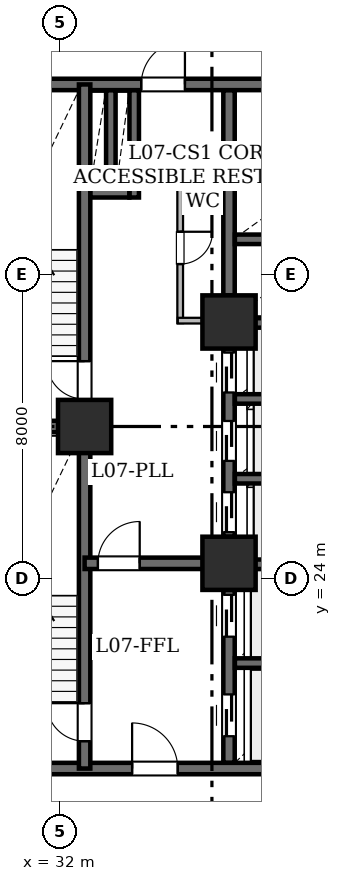
"""IFC4 building model, lengths in metres.
Left out: names, types, materials, properties, quantities, classifications, styles, units other than length and angle.
Written with IfcOpenShell. Run it as: python <this file> out.ifc"""

import sys

from ifc_helpers import new_model, si_unit, direction, frame, frame_2d, origin, origin_2d, place, context, subcontext, project, spatial, rectangle, hollow_rectangle, extrude, element, fill, save


model = new_model("IFC4")
c1 = context("Model", 3, precision=1e-05, world=origin(), true_north=direction((0.0, 1.0)))
c2 = subcontext(c1, "Body", "Model", "MODEL_VIEW")
j1 = project(units=[si_unit("LENGTHUNIT", "METRE"), si_unit("PLANEANGLEUNIT", "RADIAN")], contexts=[c1])
p1 = place(None, origin())
s1 = spatial("IfcSite", under=j1, at=p1, CompositionType="ELEMENT")
p2 = place(p1, origin())
s2 = spatial("IfcBuilding", under=s1, at=p2, CompositionType="ELEMENT")
p3 = place(p2, frame((0.0, 0.0, 33.3)))
s3 = spatial("IfcBuildingStorey", under=s2, at=p3, CompositionType="ELEMENT", Elevation=33.3)
for number, where, z_axis, x_axis in (
    (1, (32.65, 28.0, 0.0), (0.0, 0.0, 1.0), (1.0, 0.0, 0.0)),
    (2, (36.45, 24.4, 0.0), (0.0, 0.0, 1.0), (1.0, 0.0, 0.0)),
    (3, (36.45, 30.75, 0.0), (0.0, 0.0, 1.0), (1.0, 0.0, 0.0)),
):
    element("IfcColumn", number, at=place(p3, frame(where, z_axis=z_axis, x_axis=x_axis)), inside=s3, PredefinedType="COLUMN", context=c2, shape_type="SweptSolid", body=[
        extrude(hollow_rectangle(XDim=1.4, YDim=1.4, WallThickness=0.07, at=origin_2d()), origin(), (0.0, 0.0, 1.0), 3.65),
    ])
p4 = place(p3, frame((29.0, 19.0, 0.0), z_axis=(0.0, 0.0, 1.0), x_axis=(1.0, 0.0, 0.0)))
e4 = element("IfcWall", 4, at=p4, inside=s3, PredefinedType="SHEAR", context=c2, shape_type="SweptSolid", body=[
    extrude(rectangle(XDim=10.4, YDim=0.3, at=frame_2d((5.2, 0.0))), origin(), (0.0, 0.0, 1.0), 3.43),
])
p5 = place(p4, frame((4.9, 0.0, 0.0)))
e5 = element("IfcOpeningElement", 5, at=p5, cuts=e4, PredefinedType="OPENING", context=c2, shape_type="SweptSolid", body=[
    extrude(rectangle(XDim=1.2, YDim=2.15, at=frame_2d((0.6, 1.075))), frame((0.0, 0.16, 0.0), z_axis=(0.0, -1.0, 0.0), x_axis=(1.0, 0.0, 0.0)), (0.0, 0.0, 1.0), 0.32),
])
p6 = place(p3, frame((29.0, 37.0, 0.0), z_axis=(0.0, 0.0, 1.0), x_axis=(1.0, 0.0, 0.0)))
e6 = element("IfcWall", 6, at=p6, inside=s3, PredefinedType="SHEAR", context=c2, shape_type="SweptSolid", body=[
    extrude(rectangle(XDim=10.4, YDim=0.3, at=frame_2d((5.2, 0.0))), origin(), (0.0, 0.0, 1.0), 3.43),
])
p7 = place(p6, frame((5.14, 0.0, 0.0)))
e7 = element("IfcOpeningElement", 7, at=p7, cuts=e6, PredefinedType="OPENING", context=c2, shape_type="SweptSolid", body=[
    extrude(rectangle(XDim=1.15, YDim=2.2, at=frame_2d((0.575, 1.1))), frame((0.0, 0.16, 0.0), z_axis=(0.0, -1.0, 0.0), x_axis=(1.0, 0.0, 0.0)), (0.0, 0.0, 1.0), 0.32),
])
p8 = place(p3, frame((32.65, 19.0, 0.0), z_axis=(0.0, 0.0, 1.0), x_axis=(0.0, 1.0, 0.0)))
e8 = element("IfcWall", 8, at=p8, inside=s3, PredefinedType="SHEAR", context=c2, shape_type="SweptSolid", body=[
    extrude(rectangle(XDim=9.0, YDim=0.3, at=frame_2d((4.5, 0.0))), origin(), (0.0, 0.0, 1.0), 3.43),
])
p9 = place(p8, frame((0.72, 0.0, 0.0)))
e9 = element("IfcOpeningElement", 9, at=p9, cuts=e8, PredefinedType="OPENING", context=c2, shape_type="SweptSolid", body=[
    extrude(rectangle(XDim=1.0, YDim=2.15, at=frame_2d((0.5, 1.075))), frame((0.0, 0.16, 0.0), z_axis=(0.0, -1.0, 0.0), x_axis=(1.0, 0.0, 0.0)), (0.0, 0.0, 1.0), 0.32),
])
p10 = place(p3, frame((32.65, 28.0, 0.0), z_axis=(0.0, 0.0, 1.0), x_axis=(0.0, 1.0, 0.0)))
e10 = element("IfcWall", 10, at=p10, inside=s3, PredefinedType="SHEAR", context=c2, shape_type="SweptSolid", body=[
    extrude(rectangle(XDim=9.0, YDim=0.3, at=frame_2d((4.5, 0.0))), origin(), (0.0, 0.0, 1.0), 3.43),
])
p11 = place(p10, frame((0.72, 0.0, 0.0)))
e11 = element("IfcOpeningElement", 11, at=p11, cuts=e10, PredefinedType="OPENING", context=c2, shape_type="SweptSolid", body=[
    extrude(rectangle(XDim=1.0, YDim=2.15, at=frame_2d((0.5, 1.075))), frame((0.0, 0.16, 0.0), z_axis=(0.0, -1.0, 0.0), x_axis=(1.0, 0.0, 0.0)), (0.0, 0.0, 1.0), 0.32),
])
p12 = place(p3, frame((29.0, 28.0, 0.0), z_axis=(0.0, 0.0, 1.0), x_axis=(1.0, 0.0, 0.0)))
e12 = element("IfcWall", 12, at=p12, inside=s3, PredefinedType="SHEAR", context=c2, shape_type="SweptSolid", body=[
    extrude(rectangle(XDim=3.65, YDim=0.3, at=frame_2d((1.825, 0.0))), origin(), (0.0, 0.0, 1.0), 3.43),
])
p13 = place(p3, frame((32.65, 24.4, 0.0), z_axis=(0.0, 0.0, 1.0), x_axis=(1.0, 0.0, 0.0)))
e13 = element("IfcWall", 13, at=p13, inside=s3, PredefinedType="SHEAR", context=c2, shape_type="SweptSolid", body=[
    extrude(rectangle(XDim=3.8, YDim=0.3, at=frame_2d((1.9, 0.0))), origin(), (0.0, 0.0, 1.0), 3.43),
])
p14 = place(p13, frame((0.35, 0.0, 0.0)))
e14 = element("IfcOpeningElement", 14, at=p14, cuts=e13, PredefinedType="OPENING", context=c2, shape_type="SweptSolid", body=[
    extrude(rectangle(XDim=1.1, YDim=2.15, at=frame_2d((0.55, 1.075))), frame((0.0, 0.16, 0.0), z_axis=(0.0, -1.0, 0.0), x_axis=(1.0, 0.0, 0.0)), (0.0, 0.0, 1.0), 0.32),
])
p15 = place(p3, frame((36.45, 19.154, 0.0), z_axis=(0.0, 0.0, 1.0), x_axis=(0.0, 1.0, 0.0)))
e15 = element("IfcWall", 15, at=p15, inside=s3, PredefinedType="SHEAR", context=c2, shape_type="SweptSolid", body=[
    extrude(rectangle(XDim=4.546, YDim=0.3, at=frame_2d((2.273, 0.0))), origin(), (0.0, 0.0, 1.0), 3.43),
])
p16 = place(p15, frame((0.696, 0.0, 0.0)))
e16 = element("IfcOpeningElement", 16, at=p16, cuts=e15, PredefinedType="OPENING", context=c2, shape_type="SweptSolid", body=[
    extrude(rectangle(XDim=1.1, YDim=2.15, at=frame_2d((0.55, 1.075))), frame((0.0, 0.16, 0.0), z_axis=(0.0, -1.0, 0.0), x_axis=(1.0, 0.0, 0.0)), (0.0, 0.0, 1.0), 0.32),
])
p17 = place(p15, frame((3.316, 0.0, 0.0)))
e17 = element("IfcOpeningElement", 17, at=p17, cuts=e15, PredefinedType="OPENING", context=c2, shape_type="SweptSolid", body=[
    extrude(rectangle(XDim=1.1, YDim=2.15, at=frame_2d((0.55, 1.075))), frame((0.0, 0.16, 0.0), z_axis=(0.0, -1.0, 0.0), x_axis=(1.0, 0.0, 0.0)), (0.0, 0.0, 1.0), 0.32),
])
p18 = place(p3, frame((36.45, 25.1, 0.0), z_axis=(0.0, 0.0, 1.0), x_axis=(0.0, 1.0, 0.0)))
e18 = element("IfcWall", 18, at=p18, inside=s3, PredefinedType="SHEAR", context=c2, shape_type="SweptSolid", body=[
    extrude(rectangle(XDim=4.95, YDim=0.3, at=frame_2d((2.475, 0.0))), origin(), (0.0, 0.0, 1.0), 3.43),
])
p19 = place(p18, frame((0.12, 0.0, 0.0)))
e19 = element("IfcOpeningElement", 19, at=p19, cuts=e18, PredefinedType="OPENING", context=c2, shape_type="SweptSolid", body=[
    extrude(rectangle(XDim=1.05, YDim=2.15, at=frame_2d((0.525, 1.075))), frame((0.0, 0.16, 0.0), z_axis=(0.0, -1.0, 0.0), x_axis=(1.0, 0.0, 0.0)), (0.0, 0.0, 1.0), 0.32),
])
p20 = place(p18, frame((1.995, 0.0, 0.0)))
e20 = element("IfcOpeningElement", 20, at=p20, cuts=e18, PredefinedType="OPENING", context=c2, shape_type="SweptSolid", body=[
    extrude(rectangle(XDim=1.05, YDim=2.15, at=frame_2d((0.525, 1.075))), frame((0.0, 0.16, 0.0), z_axis=(0.0, -1.0, 0.0), x_axis=(1.0, 0.0, 0.0)), (0.0, 0.0, 1.0), 0.32),
])
p21 = place(p18, frame((3.795, 0.0, 0.0)))
e21 = element("IfcOpeningElement", 21, at=p21, cuts=e18, PredefinedType="OPENING", context=c2, shape_type="SweptSolid", body=[
    extrude(rectangle(XDim=1.05, YDim=2.15, at=frame_2d((0.525, 1.075))), frame((0.0, 0.16, 0.0), z_axis=(0.0, -1.0, 0.0), x_axis=(1.0, 0.0, 0.0)), (0.0, 0.0, 1.0), 0.32),
])
p22 = place(p3, frame((36.45, 31.45, 0.0), z_axis=(0.0, 0.0, 1.0), x_axis=(0.0, 1.0, 0.0)))
e22 = element("IfcWall", 22, at=p22, inside=s3, PredefinedType="SHEAR", context=c2, shape_type="SweptSolid", body=[
    extrude(rectangle(XDim=5.396, YDim=0.3, at=frame_2d((2.698, 0.0))), origin(), (0.0, 0.0, 1.0), 3.43),
])
for number, where, z_axis, x_axis in (
    (23, (36.604, 21.775, 0.0), (0.0, 0.0, 1.0), (1.0, 0.0, 0.0)),
    (24, (36.604, 24.375, 0.0), (0.0, 0.0, 1.0), (1.0, 0.0, 0.0)),
    (25, (36.604, 26.625, 0.0), (0.0, 0.0, 1.0), (1.0, 0.0, 0.0)),
    (26, (36.604, 28.725, 0.0), (0.0, 0.0, 1.0), (1.0, 0.0, 0.0)),
    (27, (36.604, 30.725, 0.0), (0.0, 0.0, 1.0), (1.0, 0.0, 0.0)),
    (28, (36.604, 32.925, 0.0), (0.0, 0.0, 1.0), (1.0, 0.0, 0.0)),
    (29, (36.604, 34.975, 0.0), (0.0, 0.0, 1.0), (1.0, 0.0, 0.0)),
):
    element("IfcWall", number, at=place(p3, frame(where, z_axis=z_axis, x_axis=x_axis)), inside=s3, PredefinedType="SHEAR", context=c2, shape_type="SweptSolid", body=[
        extrude(rectangle(XDim=2.642, YDim=0.25, at=frame_2d((1.321, 0.0))), origin(), (0.0, 0.0, 1.0), 3.43),
    ])
p23 = place(p3, frame((33.955, 34.025, 0.0), z_axis=(0.0, 0.0, 1.0), x_axis=(0.0, 1.0, 0.0)))
e30 = element("IfcWall", 30, at=p23, inside=s3, PredefinedType="SHEAR", context=c2, shape_type="SweptSolid", body=[
    extrude(rectangle(XDim=2.821, YDim=0.25, at=frame_2d((1.411, 0.0))), origin(), (0.0, 0.0, 1.0), 3.43),
])
p24 = place(p3, frame((32.804, 34.15, 0.0), z_axis=(0.0, 0.0, 1.0), x_axis=(1.0, 0.0, 0.0)))
e31 = element("IfcWall", 31, at=p24, inside=s3, PredefinedType="SHEAR", context=c2, shape_type="SweptSolid", body=[
    extrude(rectangle(XDim=1.022, YDim=0.25, at=frame_2d((0.511, 0.0))), origin(), (0.0, 0.0, 1.0), 3.43),
])
p25 = place(p3, frame((33.34, 34.279, 0.0), z_axis=(0.0, 0.0, 1.0), x_axis=(0.0, 1.0, 0.0)))
e32 = element("IfcWall", 32, at=p25, inside=s3, PredefinedType="SHEAR", context=c2, shape_type="SweptSolid", body=[
    extrude(rectangle(XDim=2.567, YDim=0.25, at=frame_2d((1.283, 0.0))), origin(), (0.0, 0.0, 1.0), 3.43),
])
p26 = place(p3, frame((36.306, 34.615, 0.0), z_axis=(0.0, 0.0, 1.0), x_axis=(-1.0, 0.0, 0.0)))
e33 = element("IfcWall", 33, at=p26, inside=s3, PredefinedType="STANDARD", context=c2, shape_type="SweptSolid", body=[
    extrude(rectangle(XDim=1.206, YDim=0.15, at=frame_2d((0.603, 0.0))), origin(), (0.0, 0.0, 1.0), 3.43),
])
p27 = place(p3, frame((35.165, 34.678, 0.0), z_axis=(0.0, 0.0, 1.0), x_axis=(0.0, -1.0, 0.0)))
e34 = element("IfcWall", 34, at=p27, inside=s3, PredefinedType="STANDARD", context=c2, shape_type="SweptSolid", body=[
    extrude(rectangle(XDim=3.958, YDim=0.15, at=frame_2d((1.979, 0.0))), origin(), (0.0, 0.0, 1.0), 3.43),
])
p28 = place(p27, frame((1.554, 0.0, 0.0)))
e35 = element("IfcOpeningElement", 35, at=p28, cuts=e34, PredefinedType="OPENING", context=c2, shape_type="SweptSolid", body=[
    extrude(rectangle(XDim=0.85, YDim=2.1, at=frame_2d((0.425, 1.05))), frame((0.0, 0.085, 0.0), z_axis=(0.0, -1.0, 0.0), x_axis=(1.0, 0.0, 0.0)), (0.0, 0.0, 1.0), 0.17),
])
p29 = place(p3, frame((35.102, 30.785, 0.0), z_axis=(0.0, 0.0, 1.0), x_axis=(1.0, 0.0, 0.0)))
e36 = element("IfcWall", 36, at=p29, inside=s3, PredefinedType="STANDARD", context=c2, shape_type="SweptSolid", body=[
    extrude(rectangle(XDim=1.198, YDim=0.15, at=frame_2d((0.599, 0.0))), origin(), (0.0, 0.0, 1.0), 3.43),
])
p30 = place(p9, origin())
e37 = element("IfcDoor", 37, at=p30, inside=s3, OperationType="SINGLE_SWING_RIGHT", PredefinedType="DOOR", context=c2, shape_type="SweptSolid", body=[
    extrude(rectangle(XDim=1.0, YDim=2.15, at=frame_2d((0.5, 1.075))), frame((0.0, 0.025, 0.0), z_axis=(0.0, -1.0, 0.0), x_axis=(1.0, 0.0, 0.0)), (0.0, 0.0, 1.0), 0.05),
])
fill(e9, e37)
p31 = place(p11, origin())
e38 = element("IfcDoor", 38, at=p31, inside=s3, OperationType="SINGLE_SWING_RIGHT", PredefinedType="DOOR", context=c2, shape_type="SweptSolid", body=[
    extrude(rectangle(XDim=1.0, YDim=2.15, at=frame_2d((0.5, 1.075))), frame((0.0, 0.025, 0.0), z_axis=(0.0, -1.0, 0.0), x_axis=(1.0, 0.0, 0.0)), (0.0, 0.0, 1.0), 0.05),
])
fill(e11, e38)
p32 = place(p14, origin())
e39 = element("IfcDoor", 39, at=p32, inside=s3, OperationType="SINGLE_SWING_RIGHT", PredefinedType="DOOR", context=c2, shape_type="SweptSolid", body=[
    extrude(rectangle(XDim=1.1, YDim=2.15, at=frame_2d((0.55, 1.075))), frame((0.0, 0.025, 0.0), z_axis=(0.0, -1.0, 0.0), x_axis=(1.0, 0.0, 0.0)), (0.0, 0.0, 1.0), 0.05),
])
fill(e14, e39)
p33 = place(p5, origin())
e40 = element("IfcDoor", 40, at=p33, inside=s3, OperationType="SINGLE_SWING_LEFT", PredefinedType="DOOR", context=c2, shape_type="SweptSolid", body=[
    extrude(rectangle(XDim=1.2, YDim=2.15, at=frame_2d((0.6, 1.075))), frame((0.0, 0.025, 0.0), z_axis=(0.0, -1.0, 0.0), x_axis=(1.0, 0.0, 0.0)), (0.0, 0.0, 1.0), 0.05),
])
fill(e5, e40)
p34 = place(p7, origin())
e41 = element("IfcDoor", 41, at=p34, inside=s3, OperationType="SINGLE_SWING_RIGHT", PredefinedType="DOOR", context=c2, shape_type="SweptSolid", body=[
    extrude(rectangle(XDim=1.15, YDim=2.2, at=frame_2d((0.575, 1.1))), frame((0.0, 0.025, 0.0), z_axis=(0.0, -1.0, 0.0), x_axis=(1.0, 0.0, 0.0)), (0.0, 0.0, 1.0), 0.05),
])
fill(e7, e41)
p35 = place(p16, origin())
e42 = element("IfcDoor", 42, at=p35, inside=s3, OperationType="SLIDING_TO_LEFT", PredefinedType="DOOR", context=c2, shape_type="SweptSolid", body=[
    extrude(rectangle(XDim=1.1, YDim=2.15, at=frame_2d((0.55, 1.075))), frame((0.0, 0.025, 0.0), z_axis=(0.0, -1.0, 0.0), x_axis=(1.0, 0.0, 0.0)), (0.0, 0.0, 1.0), 0.05),
])
fill(e16, e42)
p36 = place(p17, origin())
e43 = element("IfcDoor", 43, at=p36, inside=s3, OperationType="SLIDING_TO_LEFT", PredefinedType="DOOR", context=c2, shape_type="SweptSolid", body=[
    extrude(rectangle(XDim=1.1, YDim=2.15, at=frame_2d((0.55, 1.075))), frame((0.0, 0.025, 0.0), z_axis=(0.0, -1.0, 0.0), x_axis=(1.0, 0.0, 0.0)), (0.0, 0.0, 1.0), 0.05),
])
fill(e17, e43)
p37 = place(p19, origin())
e44 = element("IfcDoor", 44, at=p37, inside=s3, OperationType="SLIDING_TO_LEFT", PredefinedType="DOOR", context=c2, shape_type="SweptSolid", body=[
    extrude(rectangle(XDim=1.05, YDim=2.15, at=frame_2d((0.525, 1.075))), frame((0.0, 0.025, 0.0), z_axis=(0.0, -1.0, 0.0), x_axis=(1.0, 0.0, 0.0)), (0.0, 0.0, 1.0), 0.05),
])
fill(e19, e44)
p38 = place(p20, origin())
e45 = element("IfcDoor", 45, at=p38, inside=s3, OperationType="SLIDING_TO_LEFT", PredefinedType="DOOR", context=c2, shape_type="SweptSolid", body=[
    extrude(rectangle(XDim=1.05, YDim=2.15, at=frame_2d((0.525, 1.075))), frame((0.0, 0.025, 0.0), z_axis=(0.0, -1.0, 0.0), x_axis=(1.0, 0.0, 0.0)), (0.0, 0.0, 1.0), 0.05),
])
fill(e20, e45)
p39 = place(p21, origin())
e46 = element("IfcDoor", 46, at=p39, inside=s3, OperationType="SLIDING_TO_LEFT", PredefinedType="DOOR", context=c2, shape_type="SweptSolid", body=[
    extrude(rectangle(XDim=1.05, YDim=2.15, at=frame_2d((0.525, 1.075))), frame((0.0, 0.025, 0.0), z_axis=(0.0, -1.0, 0.0), x_axis=(1.0, 0.0, 0.0)), (0.0, 0.0, 1.0), 0.05),
])
fill(e21, e46)
p40 = place(p28, origin())
e47 = element("IfcDoor", 47, at=p40, inside=s3, OperationType="SINGLE_SWING_LEFT", PredefinedType="DOOR", context=c2, shape_type="SweptSolid", body=[
    extrude(rectangle(XDim=0.85, YDim=2.1, at=frame_2d((0.425, 1.05))), frame((0.0, 0.025, 0.0), z_axis=(0.0, -1.0, 0.0), x_axis=(1.0, 0.0, 0.0)), (0.0, 0.0, 1.0), 0.05),
])
fill(e35, e47)
save(model, sys.argv[1])
